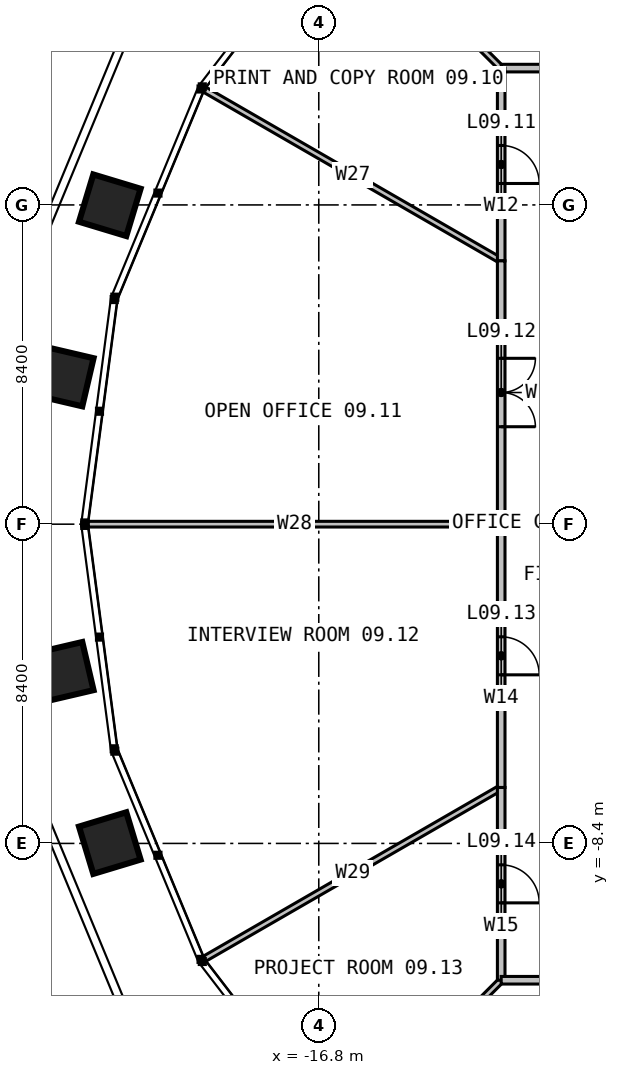
"""IFC4 building model, lengths in metres.
Left out: names, types, materials, properties, quantities, classifications, styles, units other than length and angle.
Written with IfcOpenShell. Run it as: python <this file> out.ifc"""

import sys

from ifc_helpers import new_model, si_unit, direction, frame, frame_2d, origin, place, context, subcontext, project, spatial, rectangle, extrude, element, fill, save


model = new_model("IFC4")
c1 = context("Model", 3, precision=1e-05, world=origin(), true_north=direction((0.0, 1.0)))
c2 = subcontext(c1, "Body", "Model", "MODEL_VIEW")
j1 = project(units=[si_unit("LENGTHUNIT", "METRE"), si_unit("PLANEANGLEUNIT", "RADIAN")], contexts=[c1])
p1 = place(None, origin())
s1 = spatial("IfcSite", under=j1, at=p1, CompositionType="ELEMENT")
p2 = place(p1, origin())
s2 = spatial("IfcBuilding", under=s1, at=p2, CompositionType="ELEMENT")
p3 = place(p2, frame((0.0, 0.0, 41.0)))
s3 = spatial("IfcBuildingStorey", under=s2, at=p3, CompositionType="ELEMENT", Elevation=41.0)
p4 = place(p3, frame((-6.928, 12.0, 0.0), z_axis=(0.0, 0.0, 1.0), x_axis=(-0.49999598783, 0.866027720199, 0.0)))
e1 = element("IfcWall", 1, at=p4, inside=s3, PredefinedType="PARTITIONING", context=c2, shape_type="SweptSolid", body=[
    extrude(rectangle(XDim=9.014, YDim=0.15, at=frame_2d((4.507, 0.0))), origin(), (0.0, 0.0, 1.0), 2.79),
])
p5 = place(p3, frame((-12.0, 12.0, 0.0), z_axis=(0.0, 0.0, 1.0), x_axis=(-0.707106781187, 0.707106781187, 0.0)))
e2 = element("IfcWall", 2, at=p5, inside=s3, PredefinedType="PARTITIONING", context=c2, shape_type="SweptSolid", body=[
    extrude(rectangle(XDim=5.9, YDim=0.15, at=frame_2d((2.95, 0.0))), origin(), (0.0, 0.0, 1.0), 2.79),
])
p6 = place(p3, frame((-12.0, 6.928, 0.0), z_axis=(0.0, 0.0, 1.0), x_axis=(-0.866027720199, 0.49999598783, 0.0)))
e3 = element("IfcWall", 3, at=p6, inside=s3, PredefinedType="PARTITIONING", context=c2, shape_type="SweptSolid", body=[
    extrude(rectangle(XDim=9.014, YDim=0.15, at=frame_2d((4.507, 0.0))), origin(), (0.0, 0.0, 1.0), 2.79),
])
p7 = place(p3, frame((-12.0, 0.0, 0.0), z_axis=(0.0, 0.0, 1.0), x_axis=(-1.0, 0.0, 0.0)))
e4 = element("IfcWall", 4, at=p7, inside=s3, PredefinedType="PARTITIONING", context=c2, shape_type="SweptSolid", body=[
    extrude(rectangle(XDim=10.87, YDim=0.15, at=frame_2d((5.435, 0.0))), origin(), (0.0, 0.0, 1.0), 2.79),
])
p8 = place(p3, frame((-12.0, -6.928, 0.0), z_axis=(0.0, 0.0, 1.0), x_axis=(-0.866027720199, -0.49999598783, 0.0)))
e5 = element("IfcWall", 5, at=p8, inside=s3, PredefinedType="PARTITIONING", context=c2, shape_type="SweptSolid", body=[
    extrude(rectangle(XDim=9.014, YDim=0.15, at=frame_2d((4.507, 0.0))), origin(), (0.0, 0.0, 1.0), 2.79),
])
p9 = place(p3, frame((-12.0, -12.0, 0.0), z_axis=(0.0, 0.0, 1.0), x_axis=(-0.707106781187, -0.707106781187, 0.0)))
e6 = element("IfcWall", 6, at=p9, inside=s3, PredefinedType="PARTITIONING", context=c2, shape_type="SweptSolid", body=[
    extrude(rectangle(XDim=5.9, YDim=0.15, at=frame_2d((2.95, 0.0))), origin(), (0.0, 0.0, 1.0), 2.79),
])
p10 = place(p3, frame((-6.928, -12.0, 0.0), z_axis=(0.0, 0.0, 1.0), x_axis=(-0.49999598783, -0.866027720199, 0.0)))
e7 = element("IfcWall", 7, at=p10, inside=s3, PredefinedType="PARTITIONING", context=c2, shape_type="SweptSolid", body=[
    extrude(rectangle(XDim=9.014, YDim=0.15, at=frame_2d((4.507, 0.0))), origin(), (0.0, 0.0, 1.0), 2.79),
])
p11 = place(p3, frame((-6.928, 12.0, 0.0), z_axis=(0.0, 0.0, 1.0), x_axis=(-1.0, 0.0, 0.0)))
e8 = element("IfcWall", 8, at=p11, inside=s3, PredefinedType="PARTITIONING", context=c2, shape_type="SweptSolid", body=[
    extrude(rectangle(XDim=5.072, YDim=0.2, at=frame_2d((2.536, 0.0))), origin(), (0.0, 0.0, 1.0), 3.8),
])
p12 = place(p11, frame((2.036, 0.0, 0.0)))
e9 = element("IfcOpeningElement", 9, at=p12, cuts=e8, PredefinedType="OPENING", context=c2, shape_type="SweptSolid", body=[
    extrude(rectangle(XDim=1.0, YDim=2.2, at=frame_2d((0.5, 1.1))), frame((0.0, 0.11, 0.0), z_axis=(0.0, -1.0, 0.0), x_axis=(1.0, 0.0, 0.0)), (0.0, 0.0, 1.0), 0.22),
])
p13 = place(p3, frame((-12.0, 12.0, 0.0), z_axis=(0.0, 0.0, 1.0), x_axis=(0.0, -1.0, 0.0)))
e10 = element("IfcWall", 10, at=p13, inside=s3, PredefinedType="PARTITIONING", context=c2, shape_type="SweptSolid", body=[
    extrude(rectangle(XDim=5.072, YDim=0.2, at=frame_2d((2.536, 0.0))), origin(), (0.0, 0.0, 1.0), 3.8),
])
p14 = place(p13, frame((2.036, 0.0, 0.0)))
e11 = element("IfcOpeningElement", 11, at=p14, cuts=e10, PredefinedType="OPENING", context=c2, shape_type="SweptSolid", body=[
    extrude(rectangle(XDim=1.0, YDim=2.2, at=frame_2d((0.5, 1.1))), frame((0.0, 0.11, 0.0), z_axis=(0.0, -1.0, 0.0), x_axis=(1.0, 0.0, 0.0)), (0.0, 0.0, 1.0), 0.22),
])
p15 = place(p3, frame((-12.0, 6.928, 0.0), z_axis=(0.0, 0.0, 1.0), x_axis=(0.0, -1.0, 0.0)))
e12 = element("IfcWall", 12, at=p15, inside=s3, PredefinedType="PARTITIONING", context=c2, shape_type="SweptSolid", body=[
    extrude(rectangle(XDim=6.928, YDim=0.2, at=frame_2d((3.464, 0.0))), origin(), (0.0, 0.0, 1.0), 3.8),
])
p16 = place(p15, frame((2.564, 0.0, 0.0)))
e13 = element("IfcOpeningElement", 13, at=p16, cuts=e12, PredefinedType="OPENING", context=c2, shape_type="SweptSolid", body=[
    extrude(rectangle(XDim=1.8, YDim=2.2, at=frame_2d((0.9, 1.1))), frame((0.0, 0.11, 0.0), z_axis=(0.0, -1.0, 0.0), x_axis=(1.0, 0.0, 0.0)), (0.0, 0.0, 1.0), 0.22),
])
p17 = place(p3, frame((-12.0, 0.0, 0.0), z_axis=(0.0, 0.0, 1.0), x_axis=(0.0, -1.0, 0.0)))
e14 = element("IfcWall", 14, at=p17, inside=s3, PredefinedType="PARTITIONING", context=c2, shape_type="SweptSolid", body=[
    extrude(rectangle(XDim=6.928, YDim=0.2, at=frame_2d((3.464, 0.0))), origin(), (0.0, 0.0, 1.0), 3.8),
])
p18 = place(p17, frame((2.964, 0.0, 0.0)))
e15 = element("IfcOpeningElement", 15, at=p18, cuts=e14, PredefinedType="OPENING", context=c2, shape_type="SweptSolid", body=[
    extrude(rectangle(XDim=1.0, YDim=2.2, at=frame_2d((0.5, 1.1))), frame((0.0, 0.11, 0.0), z_axis=(0.0, -1.0, 0.0), x_axis=(1.0, 0.0, 0.0)), (0.0, 0.0, 1.0), 0.22),
])
p19 = place(p3, frame((-12.0, -6.928, 0.0), z_axis=(0.0, 0.0, 1.0), x_axis=(0.0, -1.0, 0.0)))
e16 = element("IfcWall", 16, at=p19, inside=s3, PredefinedType="PARTITIONING", context=c2, shape_type="SweptSolid", body=[
    extrude(rectangle(XDim=5.072, YDim=0.2, at=frame_2d((2.536, 0.0))), origin(), (0.0, 0.0, 1.0), 3.8),
])
p20 = place(p19, frame((2.036, 0.0, 0.0)))
e17 = element("IfcOpeningElement", 17, at=p20, cuts=e16, PredefinedType="OPENING", context=c2, shape_type="SweptSolid", body=[
    extrude(rectangle(XDim=1.0, YDim=2.2, at=frame_2d((0.5, 1.1))), frame((0.0, 0.11, 0.0), z_axis=(0.0, -1.0, 0.0), x_axis=(1.0, 0.0, 0.0)), (0.0, 0.0, 1.0), 0.22),
])
p21 = place(p3, frame((-12.0, -12.0, 0.0), z_axis=(0.0, 0.0, 1.0), x_axis=(1.0, 0.0, 0.0)))
e18 = element("IfcWall", 18, at=p21, inside=s3, PredefinedType="PARTITIONING", context=c2, shape_type="SweptSolid", body=[
    extrude(rectangle(XDim=5.072, YDim=0.2, at=frame_2d((2.536, 0.0))), origin(), (0.0, 0.0, 1.0), 3.8),
])
p22 = place(p21, frame((2.036, 0.0, 0.0)))
e19 = element("IfcOpeningElement", 19, at=p22, cuts=e18, PredefinedType="OPENING", context=c2, shape_type="SweptSolid", body=[
    extrude(rectangle(XDim=1.0, YDim=2.2, at=frame_2d((0.5, 1.1))), frame((0.0, 0.11, 0.0), z_axis=(0.0, -1.0, 0.0), x_axis=(1.0, 0.0, 0.0)), (0.0, 0.0, 1.0), 0.22),
])
p23 = place(p14, origin())
e20 = element("IfcDoor", 20, at=p23, inside=s3, OperationType="SINGLE_SWING_RIGHT", PredefinedType="DOOR", context=c2, shape_type="SweptSolid", body=[
    extrude(rectangle(XDim=1.0, YDim=2.2, at=frame_2d((0.5, 1.1))), frame((0.0, 0.025, 0.0), z_axis=(0.0, -1.0, 0.0), x_axis=(1.0, 0.0, 0.0)), (0.0, 0.0, 1.0), 0.05),
])
fill(e11, e20)
p24 = place(p16, origin())
e21 = element("IfcDoor", 21, at=p24, inside=s3, OperationType="DOUBLE_DOOR_SINGLE_SWING", PredefinedType="DOOR", context=c2, shape_type="SweptSolid", body=[
    extrude(rectangle(XDim=1.8, YDim=2.2, at=frame_2d((0.9, 1.1))), frame((0.0, 0.025, 0.0), z_axis=(0.0, -1.0, 0.0), x_axis=(1.0, 0.0, 0.0)), (0.0, 0.0, 1.0), 0.05),
])
fill(e13, e21)
p25 = place(p18, origin())
e22 = element("IfcDoor", 22, at=p25, inside=s3, OperationType="SINGLE_SWING_RIGHT", PredefinedType="DOOR", context=c2, shape_type="SweptSolid", body=[
    extrude(rectangle(XDim=1.0, YDim=2.2, at=frame_2d((0.5, 1.1))), frame((0.0, 0.025, 0.0), z_axis=(0.0, -1.0, 0.0), x_axis=(1.0, 0.0, 0.0)), (0.0, 0.0, 1.0), 0.05),
])
fill(e15, e22)
p26 = place(p20, origin())
e23 = element("IfcDoor", 23, at=p26, inside=s3, OperationType="SINGLE_SWING_RIGHT", PredefinedType="DOOR", context=c2, shape_type="SweptSolid", body=[
    extrude(rectangle(XDim=1.0, YDim=2.2, at=frame_2d((0.5, 1.1))), frame((0.0, 0.025, 0.0), z_axis=(0.0, -1.0, 0.0), x_axis=(1.0, 0.0, 0.0)), (0.0, 0.0, 1.0), 0.05),
])
fill(e17, e23)
save(model, sys.argv[1])
